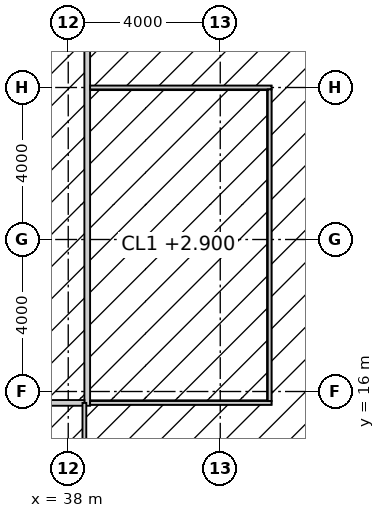
"""IFC4 building model, lengths in metres.
Left out: names, types, materials, properties, quantities, classifications, styles, units other than length and angle.
Written with IfcOpenShell. Run it as: python <this file> out.ifc"""

import sys

from ifc_helpers import new_model, si_unit, direction, frame, frame_2d, origin, place, context, subcontext, project, spatial, rectangle, extrude, element, fill, save


model = new_model("IFC4")
c1 = context("Model", 3, precision=1e-05, world=origin(), true_north=direction((0.0, 1.0)))
c2 = subcontext(c1, "Body", "Model", "MODEL_VIEW")
j1 = project(units=[si_unit("LENGTHUNIT", "METRE"), si_unit("PLANEANGLEUNIT", "RADIAN")], contexts=[c1])
p1 = place(None, origin())
s1 = spatial("IfcSite", under=j1, at=p1, CompositionType="ELEMENT")
p2 = place(p1, origin())
s2 = spatial("IfcBuilding", under=s1, at=p2, CompositionType="ELEMENT")
p3 = place(p2, frame((0.0, 0.0, 214.2)))
s3 = spatial("IfcBuildingStorey", under=s2, at=p3, CompositionType="ELEMENT", Elevation=214.2)
p4 = place(p3, frame((38.5, 15.625, 0.0), z_axis=(0.0, 0.0, 1.0), x_axis=(0.0, 1.0, 0.0)))
e1 = element("IfcWall", 1, at=p4, inside=s3, PredefinedType="PARTITIONING", context=c2, shape_type="SweptSolid", body=[
    extrude(rectangle(XDim=20.95, YDim=0.15, at=frame_2d((10.475, 0.0))), origin(), (0.0, 0.0, 1.0), 3.85),
])
p5 = place(p4, frame((9.575, 0.0, 0.0)))
e2 = element("IfcOpeningElement", 2, at=p5, cuts=e1, PredefinedType="OPENING", context=c2, shape_type="SweptSolid", body=[
    extrude(rectangle(XDim=1.8, YDim=2.4, at=frame_2d((0.9, 1.2))), frame((0.0, 0.085, 0.0), z_axis=(0.0, -1.0, 0.0), x_axis=(1.0, 0.0, 0.0)), (0.0, 0.0, 1.0), 0.17),
])
p6 = place(p3, frame((17.5, 15.7, 0.0), z_axis=(0.0, 0.0, 1.0), x_axis=(1.0, 0.0, 0.0)))
e3 = element("IfcWall", 3, at=p6, inside=s3, PredefinedType="PARTITIONING", context=c2, shape_type="SweptSolid", body=[
    extrude(rectangle(XDim=20.925, YDim=0.15, at=frame_2d((10.462, 0.0))), origin(), (0.0, 0.0, 1.0), 3.85),
])
p7 = place(p3, frame((38.575, 15.7, 0.0), z_axis=(0.0, 0.0, 1.0), x_axis=(1.0, 0.0, 0.0)))
e4 = element("IfcWall", 4, at=p7, inside=s3, PredefinedType="PARTITIONING", context=c2, shape_type="SweptSolid", body=[
    extrude(rectangle(XDim=4.775, YDim=0.1, at=frame_2d((2.388, 0.0))), origin(), (0.0, 0.0, 1.0), 3.85),
])
p8 = place(p3, frame((38.575, 24.0, 0.0), z_axis=(0.0, 0.0, 1.0), x_axis=(1.0, 0.0, 0.0)))
e5 = element("IfcWall", 5, at=p8, inside=s3, PredefinedType="PARTITIONING", context=c2, shape_type="SweptSolid", body=[
    extrude(rectangle(XDim=4.775, YDim=0.1, at=frame_2d((2.388, 0.0))), origin(), (0.0, 0.0, 1.0), 2.95),
])
p9 = place(p3, frame((43.3, 15.75, 0.0), z_axis=(0.0, 0.0, 1.0), x_axis=(0.0, 1.0, 0.0)))
e6 = element("IfcWall", 6, at=p9, inside=s3, PredefinedType="PARTITIONING", context=c2, shape_type="SweptSolid", body=[
    extrude(rectangle(XDim=8.2, YDim=0.1, at=frame_2d((4.1, 0.0))), origin(), (0.0, 0.0, 1.0), 3.85),
])
p10 = place(p9, frame((3.2, 0.0, 0.0)))
e7 = element("IfcOpeningElement", 7, at=p10, cuts=e6, PredefinedType="OPENING", context=c2, shape_type="SweptSolid", body=[
    extrude(rectangle(XDim=1.8, YDim=2.4, at=frame_2d((0.9, 1.2))), frame((0.0, 0.06, 0.0), z_axis=(0.0, -1.0, 0.0), x_axis=(1.0, 0.0, 0.0)), (0.0, 0.0, 1.0), 0.12),
])
p11 = place(p3, frame((38.425, 15.7, 0.0), z_axis=(0.0, 0.0, 1.0), x_axis=(0.0, -1.0, 0.0)))
e8 = element("IfcWall", 8, at=p11, inside=s3, PredefinedType="PARTITIONING", context=c2, shape_type="SweptSolid", body=[
    extrude(rectangle(XDim=7.4, YDim=0.1, at=frame_2d((3.7, 0.0))), origin(), (0.0, 0.0, 1.0), 3.85),
])
p12 = place(p10, origin())
e9 = element("IfcDoor", 9, at=p12, inside=s3, OperationType="DOUBLE_DOOR_DOUBLE_SWING", PredefinedType="DOOR", context=c2, shape_type="SweptSolid", body=[
    extrude(rectangle(XDim=1.8, YDim=2.4, at=frame_2d((0.9, 1.2))), frame((0.0, 0.025, 0.0), z_axis=(0.0, -1.0, 0.0), x_axis=(1.0, 0.0, 0.0)), (0.0, 0.0, 1.0), 0.05),
])
fill(e7, e9)
save(model, sys.argv[1])
